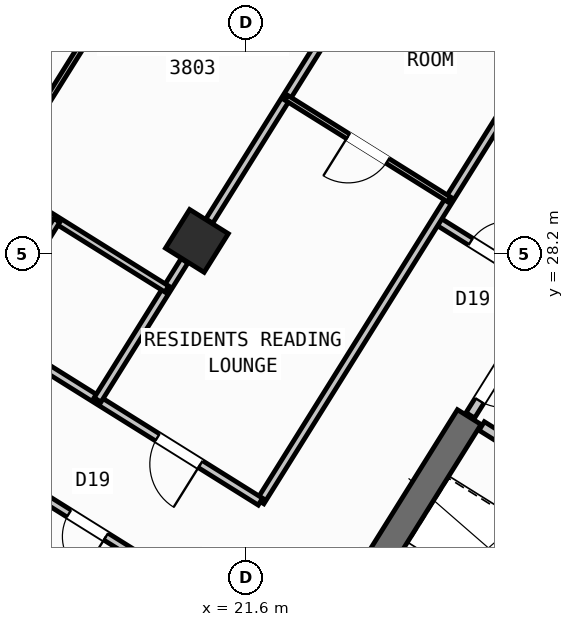
"""IFC4 building model, lengths in metres.
Left out: names, types, materials, properties, quantities, classifications, styles, units other than length and angle.
Written with IfcOpenShell. Run it as: python <this file> out.ifc"""

import sys

from ifc_helpers import new_model, si_unit, direction, frame, frame_2d, origin, origin_2d, place, context, subcontext, project, spatial, rectangle, hollow_rectangle, extrude, source, transform, mapped, element, fill, save


model = new_model("IFC4")
c1 = context("Model", 3, precision=1e-05, world=origin(), true_north=direction((0.0, 1.0)))
c2 = subcontext(c1, "Body", "Model", "MODEL_VIEW")
j1 = project(units=[si_unit("LENGTHUNIT", "METRE"), si_unit("PLANEANGLEUNIT", "RADIAN")], contexts=[c1])
p1 = place(None, origin())
s1 = spatial("IfcSite", under=j1, at=p1, CompositionType="ELEMENT")
p2 = place(p1, origin())
s2 = spatial("IfcBuilding", under=s1, at=p2, CompositionType="ELEMENT")
p3 = place(p2, frame((0.0, 0.0, 151.5)))
s3 = spatial("IfcBuildingStorey", under=s2, at=p3, CompositionType="ELEMENT", Elevation=151.5)
p4 = place(p3, frame((26.007, 24.976, 0.0), z_axis=(0.0, 0.0, 1.0), x_axis=(-0.529923795287, -0.848045264823, 0.0)))
e1 = element("IfcWall", 1, at=p4, inside=s3, PredefinedType="SHEAR", context=c2, shape_type="SweptSolid", body=[
    extrude(rectangle(XDim=6.425, YDim=0.55, at=frame_2d((3.212, 0.0))), origin(), (0.0, 0.0, 1.0), 3.35),
])
m1 = source(origin(), c2, "Body", "SweptSolid", [
    extrude(hollow_rectangle(XDim=0.9, YDim=0.9, WallThickness=0.036, at=origin_2d()), origin(), (0.0, 0.0, 1.0), 3.6),
])
p5 = place(p3, frame((20.632, 28.452, 0.0), z_axis=(0.0, 0.0, 1.0), x_axis=(-0.848048096156, 0.529919264233, 0.0)))
e2 = element("IfcColumn", 2, at=p5, inside=s3, PredefinedType="COLUMN", context=c2, shape_type="MappedRepresentation", body=[
    mapped(m1, transform((0.0, 0.0, 0.0), scale=1.0)),
])
p6 = place(p3, frame((29.268, 6.429, 0.0), z_axis=(0.0, 0.0, 1.0), x_axis=(-0.848049971435, 0.529916263149, 0.0)))
e3 = element("IfcWall", 3, at=p6, inside=s3, PredefinedType="STANDARD", context=c2, shape_type="SweptSolid", body=[
    extrude(rectangle(XDim=31.588, YDim=0.32, at=frame_2d((15.794, 0.0))), origin(), (0.0, 0.0, 1.0), 3.35),
])
p7 = place(p6, frame((16.362, 0.0, 0.0)))
e4 = element("IfcOpeningElement", 4, at=p7, cuts=e3, PredefinedType="OPENING", context=c2, shape_type="SweptSolid", body=[
    extrude(rectangle(XDim=1.2, YDim=2.15, at=frame_2d((0.6, 1.075))), frame((0.0, 0.17, 0.0), z_axis=(0.0, -1.0, 0.0), x_axis=(1.0, 0.0, 0.0)), (0.0, 0.0, 1.0), 0.34),
])
p8 = place(p6, frame((2.989, 0.0, 0.8)))
e5 = element("IfcOpeningElement", 5, at=p8, cuts=e3, PredefinedType="OPENING", context=c2, shape_type="SweptSolid", body=[
    extrude(rectangle(XDim=2.1, YDim=1.55, at=frame_2d((1.05, 0.775))), frame((0.0, 0.17, 0.0), z_axis=(0.0, -1.0, 0.0), x_axis=(1.0, 0.0, 0.0)), (0.0, 0.0, 1.0), 0.34),
])
p9 = place(p6, frame((8.359, 0.0, 0.8)))
e6 = element("IfcOpeningElement", 6, at=p9, cuts=e3, PredefinedType="OPENING", context=c2, shape_type="SweptSolid", body=[
    extrude(rectangle(XDim=2.1, YDim=1.55, at=frame_2d((1.05, 0.775))), frame((0.0, 0.17, 0.0), z_axis=(0.0, -1.0, 0.0), x_axis=(1.0, 0.0, 0.0)), (0.0, 0.0, 1.0), 0.34),
])
p10 = place(p6, frame((13.284, 0.0, 0.95)))
e7 = element("IfcOpeningElement", 7, at=p10, cuts=e3, PredefinedType="OPENING", context=c2, shape_type="SweptSolid", body=[
    extrude(rectangle(XDim=1.2, YDim=1.4, at=frame_2d((0.6, 0.7))), frame((0.0, 0.17, 0.0), z_axis=(0.0, -1.0, 0.0), x_axis=(1.0, 0.0, 0.0)), (0.0, 0.0, 1.0), 0.34),
])
p11 = place(p6, frame((20.259, 0.0, 0.95)))
e8 = element("IfcOpeningElement", 8, at=p11, cuts=e3, PredefinedType="OPENING", context=c2, shape_type="SweptSolid", body=[
    extrude(rectangle(XDim=1.2, YDim=1.4, at=frame_2d((0.6, 0.7))), frame((0.0, 0.17, 0.0), z_axis=(0.0, -1.0, 0.0), x_axis=(1.0, 0.0, 0.0)), (0.0, 0.0, 1.0), 0.34),
])
p12 = place(p6, frame((22.929, 0.0, 0.95)))
e9 = element("IfcOpeningElement", 9, at=p12, cuts=e3, PredefinedType="OPENING", context=c2, shape_type="SweptSolid", body=[
    extrude(rectangle(XDim=1.2, YDim=1.4, at=frame_2d((0.6, 0.7))), frame((0.0, 0.17, 0.0), z_axis=(0.0, -1.0, 0.0), x_axis=(1.0, 0.0, 0.0)), (0.0, 0.0, 1.0), 0.34),
])
p13 = place(p6, frame((27.481, 0.0, 0.8)))
e10 = element("IfcOpeningElement", 10, at=p13, cuts=e3, PredefinedType="OPENING", context=c2, shape_type="SweptSolid", body=[
    extrude(rectangle(XDim=2.1, YDim=1.55, at=frame_2d((1.05, 0.775))), frame((0.0, 0.17, 0.0), z_axis=(0.0, -1.0, 0.0), x_axis=(1.0, 0.0, 0.0)), (0.0, 0.0, 1.0), 0.34),
])
p14 = place(p3, frame((14.138, 41.825, 0.0), z_axis=(0.0, 0.0, 1.0), x_axis=(0.848046498049, -0.529921821731, 0.0)))
e11 = element("IfcWall", 11, at=p14, inside=s3, PredefinedType="STANDARD", context=c2, shape_type="SweptSolid", body=[
    extrude(rectangle(XDim=31.588, YDim=0.32, at=frame_2d((15.794, 0.0))), origin(), (0.0, 0.0, 1.0), 3.35),
])
p15 = place(p14, frame((9.792, 0.0, 0.0)))
e12 = element("IfcOpeningElement", 12, at=p15, cuts=e11, PredefinedType="OPENING", context=c2, shape_type="SweptSolid", body=[
    extrude(rectangle(XDim=1.05, YDim=2.15, at=frame_2d((0.525, 1.075))), frame((0.0, 0.17, 0.0), z_axis=(0.0, -1.0, 0.0), x_axis=(1.0, 0.0, 0.0)), (0.0, 0.0, 1.0), 0.34),
])
p16 = place(p14, frame((0.791, 0.0, 0.85)))
e13 = element("IfcOpeningElement", 13, at=p16, cuts=e11, PredefinedType="OPENING", context=c2, shape_type="SweptSolid", body=[
    extrude(rectangle(XDim=1.8, YDim=1.5, at=frame_2d((0.9, 0.75))), frame((0.0, 0.17, 0.0), z_axis=(0.0, -1.0, 0.0), x_axis=(1.0, 0.0, 0.0)), (0.0, 0.0, 1.0), 0.34),
])
p17 = place(p14, frame((3.996, 0.0, 0.95)))
e14 = element("IfcOpeningElement", 14, at=p17, cuts=e11, PredefinedType="OPENING", context=c2, shape_type="SweptSolid", body=[
    extrude(rectangle(XDim=1.2, YDim=1.4, at=frame_2d((0.6, 0.7))), frame((0.0, 0.17, 0.0), z_axis=(0.0, -1.0, 0.0), x_axis=(1.0, 0.0, 0.0)), (0.0, 0.0, 1.0), 0.34),
])
p18 = place(p14, frame((13.874, 0.0, 0.85)))
e15 = element("IfcOpeningElement", 15, at=p18, cuts=e11, PredefinedType="OPENING", context=c2, shape_type="SweptSolid", body=[
    extrude(rectangle(XDim=1.5, YDim=1.5, at=frame_2d((0.75, 0.75))), frame((0.0, 0.17, 0.0), z_axis=(0.0, -1.0, 0.0), x_axis=(1.0, 0.0, 0.0)), (0.0, 0.0, 1.0), 0.34),
])
p19 = place(p14, frame((17.104, 0.0, 1.0)))
e16 = element("IfcOpeningElement", 16, at=p19, cuts=e11, PredefinedType="OPENING", context=c2, shape_type="SweptSolid", body=[
    extrude(rectangle(XDim=0.9, YDim=1.25, at=frame_2d((0.45, 0.625))), frame((0.0, 0.17, 0.0), z_axis=(0.0, -1.0, 0.0), x_axis=(1.0, 0.0, 0.0)), (0.0, 0.0, 1.0), 0.34),
])
p20 = place(p14, frame((22.069, 0.0, 1.0)))
e17 = element("IfcOpeningElement", 17, at=p20, cuts=e11, PredefinedType="OPENING", context=c2, shape_type="SweptSolid", body=[
    extrude(rectangle(XDim=0.9, YDim=1.25, at=frame_2d((0.45, 0.625))), frame((0.0, 0.17, 0.0), z_axis=(0.0, -1.0, 0.0), x_axis=(1.0, 0.0, 0.0)), (0.0, 0.0, 1.0), 0.34),
])
p21 = place(p14, frame((27.519, 0.0, 1.0)))
e18 = element("IfcOpeningElement", 18, at=p21, cuts=e11, PredefinedType="OPENING", context=c2, shape_type="SweptSolid", body=[
    extrude(rectangle(XDim=0.9, YDim=1.25, at=frame_2d((0.45, 0.625))), frame((0.0, 0.17, 0.0), z_axis=(0.0, -1.0, 0.0), x_axis=(1.0, 0.0, 0.0)), (0.0, 0.0, 1.0), 0.34),
])
p22 = place(p3, frame((31.525, 21.504, 0.0), z_axis=(0.0, 0.0, 1.0), x_axis=(-0.848040211232, 0.529931882541, 0.0)))
e19 = element("IfcWall", 19, at=p22, inside=s3, PredefinedType="STANDARD", context=c2, shape_type="SweptSolid", body=[
    extrude(rectangle(XDim=6.218, YDim=0.2, at=frame_2d((3.109, 0.0))), origin(), (0.0, 0.0, 1.0), 3.34),
])
p23 = place(p22, frame((4.4, 0.0, 0.0)))
e20 = element("IfcOpeningElement", 20, at=p23, cuts=e19, PredefinedType="OPENING", context=c2, shape_type="SweptSolid", body=[
    extrude(rectangle(XDim=0.86, YDim=2.05, at=frame_2d((0.43, 1.025))), frame((0.0, 0.11, 0.0), z_axis=(0.0, -1.0, 0.0), x_axis=(1.0, 0.0, 0.0)), (0.0, 0.0, 1.0), 0.22),
])
p24 = place(p22, frame((0.35, 0.0, 0.0)))
e21 = element("IfcOpeningElement", 21, at=p24, cuts=e19, PredefinedType="OPENING", context=c2, shape_type="SweptSolid", body=[
    extrude(rectangle(XDim=0.86, YDim=2.05, at=frame_2d((0.43, 1.025))), frame((0.0, 0.11, 0.0), z_axis=(0.0, -1.0, 0.0), x_axis=(1.0, 0.0, 0.0)), (0.0, 0.0, 1.0), 0.22),
])
p25 = place(p3, frame((27.596, 27.52, 0.0), z_axis=(0.0, 0.0, 1.0), x_axis=(-0.529865479138, -0.848081702443, 0.0)))
e22 = element("IfcWall", 22, at=p25, inside=s3, PredefinedType="STANDARD", context=c2, shape_type="SweptSolid", body=[
    extrude(rectangle(XDim=2.96, YDim=0.2, at=frame_2d((1.48, 0.0))), origin(), (0.0, 0.0, 1.0), 3.34),
])
p26 = place(p25, frame((1.76, 0.0, 0.0)))
e23 = element("IfcOpeningElement", 23, at=p26, cuts=e22, PredefinedType="OPENING", context=c2, shape_type="SweptSolid", body=[
    extrude(rectangle(XDim=0.86, YDim=2.05, at=frame_2d((0.43, 1.025))), frame((0.0, 0.11, 0.0), z_axis=(0.0, -1.0, 0.0), x_axis=(1.0, 0.0, 0.0)), (0.0, 0.0, 1.0), 0.22),
])
p27 = place(p3, frame((27.57, 27.478, 0.0), z_axis=(0.0, 0.0, 1.0), x_axis=(-0.848050851465, 0.529914854792, 0.0)))
e24 = element("IfcWall", 24, at=p27, inside=s3, PredefinedType="PARTITIONING", context=c2, shape_type="SweptSolid", body=[
    extrude(rectangle(XDim=2.61, YDim=0.16, at=frame_2d((1.305, 0.0))), origin(), (0.0, 0.0, 1.0), 3.34),
])
p28 = place(p27, frame((0.95, 0.0, 0.0)))
e25 = element("IfcOpeningElement", 25, at=p28, cuts=e24, PredefinedType="OPENING", context=c2, shape_type="SweptSolid", body=[
    extrude(rectangle(XDim=0.86, YDim=2.05, at=frame_2d((0.43, 1.025))), frame((0.0, 0.09, 0.0), z_axis=(0.0, -1.0, 0.0), x_axis=(1.0, 0.0, 0.0)), (0.0, 0.0, 1.0), 0.18),
])
p29 = place(p3, frame((27.953, 33.016, 0.0), z_axis=(0.0, 0.0, 1.0), x_axis=(-0.529905022231, -0.848056995381, 0.0)))
e26 = element("IfcWall", 26, at=p29, inside=s3, PredefinedType="PARTITIONING", context=c2, shape_type="SweptSolid", body=[
    extrude(rectangle(XDim=11.45, YDim=0.16, at=frame_2d((5.725, 0.0))), origin(), (0.0, 0.0, 1.0), 3.34),
])
p30 = place(p3, frame((21.885, 23.306, 0.0), z_axis=(0.0, 0.0, 1.0), x_axis=(-0.848052408131, 0.529912363569, 0.0)))
e27 = element("IfcWall", 27, at=p30, inside=s3, PredefinedType="PARTITIONING", context=c2, shape_type="SweptSolid", body=[
    extrude(rectangle(XDim=16.73, YDim=0.16, at=frame_2d((8.365, 0.0))), origin(), (0.0, 0.0, 1.0), 3.34),
])
p31 = place(p30, frame((1.395, 0.0, 0.0)))
e28 = element("IfcOpeningElement", 28, at=p31, cuts=e27, PredefinedType="OPENING", context=c2, shape_type="SweptSolid", body=[
    extrude(rectangle(XDim=1.0, YDim=2.1, at=frame_2d((0.5, 1.05))), frame((0.0, 0.09, 0.0), z_axis=(0.0, -1.0, 0.0), x_axis=(1.0, 0.0, 0.0)), (0.0, 0.0, 1.0), 0.18),
])
p32 = place(p30, frame((7.82, 0.0, 0.0)))
e29 = element("IfcOpeningElement", 29, at=p32, cuts=e27, PredefinedType="OPENING", context=c2, shape_type="SweptSolid", body=[
    extrude(rectangle(XDim=1.0, YDim=2.1, at=frame_2d((0.5, 1.05))), frame((0.0, 0.09, 0.0), z_axis=(0.0, -1.0, 0.0), x_axis=(1.0, 0.0, 0.0)), (0.0, 0.0, 1.0), 0.18),
])
p33 = place(p30, frame((11.14, 0.0, 0.0)))
e30 = element("IfcOpeningElement", 30, at=p33, cuts=e27, PredefinedType="OPENING", context=c2, shape_type="SweptSolid", body=[
    extrude(rectangle(XDim=1.0, YDim=2.1, at=frame_2d((0.5, 1.05))), frame((0.0, 0.09, 0.0), z_axis=(0.0, -1.0, 0.0), x_axis=(1.0, 0.0, 0.0)), (0.0, 0.0, 1.0), 0.18),
])
p34 = place(p3, frame((20.719, 21.44, 0.0), z_axis=(0.0, 0.0, 1.0), x_axis=(-0.848048310262, 0.529918921593, 0.0)))
e31 = element("IfcWall", 31, at=p34, inside=s3, PredefinedType="PARTITIONING", context=c2, shape_type="SweptSolid", body=[
    extrude(rectangle(XDim=16.73, YDim=0.16, at=frame_2d((8.365, 0.0))), origin(), (0.0, 0.0, 1.0), 3.34),
])
p35 = place(p34, frame((2.22, 0.0, 0.0)))
e32 = element("IfcOpeningElement", 32, at=p35, cuts=e31, PredefinedType="OPENING", context=c2, shape_type="SweptSolid", body=[
    extrude(rectangle(XDim=0.86, YDim=2.05, at=frame_2d((0.43, 1.025))), frame((0.0, 0.09, 0.0), z_axis=(0.0, -1.0, 0.0), x_axis=(1.0, 0.0, 0.0)), (0.0, 0.0, 1.0), 0.18),
])
p36 = place(p34, frame((6.49, 0.0, 0.0)))
e33 = element("IfcOpeningElement", 33, at=p36, cuts=e31, PredefinedType="OPENING", context=c2, shape_type="SweptSolid", body=[
    extrude(rectangle(XDim=1.0, YDim=2.1, at=frame_2d((0.5, 1.05))), frame((0.0, 0.09, 0.0), z_axis=(0.0, -1.0, 0.0), x_axis=(1.0, 0.0, 0.0)), (0.0, 0.0, 1.0), 0.18),
])
p37 = place(p34, frame((14.304, 0.0, 0.0)))
e34 = element("IfcOpeningElement", 34, at=p37, cuts=e31, PredefinedType="OPENING", context=c2, shape_type="SweptSolid", body=[
    extrude(rectangle(XDim=1.0, YDim=2.1, at=frame_2d((0.5, 1.05))), frame((0.0, 0.09, 0.0), z_axis=(0.0, -1.0, 0.0), x_axis=(1.0, 0.0, 0.0)), (0.0, 0.0, 1.0), 0.18),
])
p38 = place(p3, frame((24.256, 34.251, 0.0), z_axis=(0.0, 0.0, 1.0), x_axis=(-0.529919772691, -0.848047778437, 0.0)))
e35 = element("IfcWall", 35, at=p38, inside=s3, PredefinedType="PARTITIONING", context=c2, shape_type="SweptSolid", body=[
    extrude(rectangle(XDim=6.376, YDim=0.16, at=frame_2d((3.188, 0.0))), origin(), (0.0, 0.0, 1.0), 2.775),
])
p39 = place(p3, frame((20.387, 28.06, 0.0), z_axis=(0.0, 0.0, 1.0), x_axis=(-0.529890499457, -0.848066069705, 0.0)))
e36 = element("IfcWall", 36, at=p39, inside=s3, PredefinedType="PARTITIONING", context=c2, shape_type="SweptSolid", body=[
    extrude(rectangle(XDim=3.238, YDim=0.16, at=frame_2d((1.619, 0.0))), origin(), (0.0, 0.0, 1.0), 2.775),
])
p40 = place(p3, frame((25.612, 29.269, 0.0), z_axis=(0.0, 0.0, 1.0), x_axis=(-0.84803087207, 0.529946827537, 0.0)))
e37 = element("IfcWall", 37, at=p40, inside=s3, PredefinedType="PARTITIONING", context=c2, shape_type="SweptSolid", body=[
    extrude(rectangle(XDim=3.79, YDim=0.11, at=frame_2d((1.895, 0.0))), origin(), (0.0, 0.0, 1.0), 3.34),
])
p41 = place(p40, frame((1.435, 0.0, 0.0)))
e38 = element("IfcOpeningElement", 38, at=p41, cuts=e37, PredefinedType="OPENING", context=c2, shape_type="SweptSolid", body=[
    extrude(rectangle(XDim=0.92, YDim=2.08, at=frame_2d((0.46, 1.04))), frame((0.0, 0.065, 0.0), z_axis=(0.0, -1.0, 0.0), x_axis=(1.0, 0.0, 0.0)), (0.0, 0.0, 1.0), 0.13),
])
p42 = place(p3, frame((20.039, 27.502, 0.0), z_axis=(0.0, 0.0, 1.0), x_axis=(-0.848039019877, 0.529933789039, 0.0)))
e39 = element("IfcWall", 39, at=p42, inside=s3, PredefinedType="PLUMBINGWALL", context=c2, shape_type="SweptSolid", body=[
    extrude(rectangle(XDim=6.4, YDim=0.14, at=frame_2d((3.2, 0.0))), origin(), (0.0, 0.0, 1.0), 3.34),
])
p43 = place(p42, frame((2.824, 0.0, 0.0)))
e40 = element("IfcOpeningElement", 40, at=p43, cuts=e39, PredefinedType="OPENING", context=c2, shape_type="SweptSolid", body=[
    extrude(rectangle(XDim=0.78, YDim=2.05, at=frame_2d((0.39, 1.025))), frame((0.0, 0.08, 0.0), z_axis=(0.0, -1.0, 0.0), x_axis=(1.0, 0.0, 0.0)), (0.0, 0.0, 1.0), 0.16),
])
p44 = place(p3, frame((17.867, 28.859, 0.0), z_axis=(0.0, 0.0, 1.0), x_axis=(-0.529913878929, -0.848051461244, 0.0)))
e41 = element("IfcWall", 41, at=p44, inside=s3, PredefinedType="PLUMBINGWALL", context=c2, shape_type="SweptSolid", body=[
    extrude(rectangle(XDim=2.58, YDim=0.14, at=frame_2d((1.29, 0.0))), origin(), (0.0, 0.0, 1.0), 3.34),
])
p45 = place(p44, frame((0.9, 0.0, 0.0)))
e42 = element("IfcOpeningElement", 42, at=p45, cuts=e41, PredefinedType="OPENING", context=c2, shape_type="SweptSolid", body=[
    extrude(rectangle(XDim=0.78, YDim=2.05, at=frame_2d((0.39, 1.025))), frame((0.0, 0.08, 0.0), z_axis=(0.0, -1.0, 0.0), x_axis=(1.0, 0.0, 0.0)), (0.0, 0.0, 1.0), 0.16),
])
p46 = place(p3, frame((21.517, 37.356, 0.0), z_axis=(0.0, 0.0, 1.0), x_axis=(-0.529919705034, -0.848047820713, 0.0)))
e43 = element("IfcWall", 43, at=p46, inside=s3, PredefinedType="PARTITIONING", context=c2, shape_type="SweptSolid", body=[
    extrude(rectangle(XDim=9.14, YDim=0.11, at=frame_2d((4.57, 0.0))), origin(), (0.0, 0.0, 1.0), 3.34),
])
p47 = place(p46, frame((0.47, 0.0, 0.0)))
e44 = element("IfcOpeningElement", 44, at=p47, cuts=e43, PredefinedType="OPENING", context=c2, shape_type="SweptSolid", body=[
    extrude(rectangle(XDim=0.92, YDim=2.08, at=frame_2d((0.46, 1.04))), frame((0.0, 0.065, 0.0), z_axis=(0.0, -1.0, 0.0), x_axis=(1.0, 0.0, 0.0)), (0.0, 0.0, 1.0), 0.13),
])
m2 = source(origin(), c2, "Body", "SweptSolid", [
    extrude(rectangle(XDim=0.86, YDim=2.05, at=frame_2d((0.43, 1.025))), frame((0.0, 0.025, 0.0), z_axis=(0.0, -1.0, 0.0), x_axis=(1.0, 0.0, 0.0)), (0.0, 0.0, 1.0), 0.05),
])
p48 = place(p28, frame((0.86, 0.0, 0.0), z_axis=(0.0, 0.0, 1.0), x_axis=(-1.0, 0.0, 0.0)))
e45 = element("IfcDoor", 45, at=p48, inside=s3, OperationType="SINGLE_SWING_RIGHT", PredefinedType="DOOR", context=c2, shape_type="MappedRepresentation", body=[
    mapped(m2, transform((0.0, 0.0, 0.0), scale=1.0)),
])
fill(e25, e45)
p49 = place(p26, origin())
e46 = element("IfcDoor", 46, at=p49, inside=s3, OperationType="SINGLE_SWING_LEFT", PredefinedType="DOOR", context=c2, shape_type="MappedRepresentation", body=[
    mapped(m2, transform((0.0, 0.0, 0.0), scale=1.0)),
])
fill(e23, e46)
p50 = place(p35, origin())
e47 = element("IfcDoor", 47, at=p50, inside=s3, OperationType="SINGLE_SWING_LEFT", PredefinedType="DOOR", context=c2, shape_type="MappedRepresentation", body=[
    mapped(m2, transform((0.0, 0.0, 0.0), scale=1.0)),
])
fill(e32, e47)
m3 = source(origin(), c2, "Body", "SweptSolid", [
    extrude(rectangle(XDim=1.0, YDim=2.1, at=frame_2d((0.5, 1.05))), frame((0.0, 0.025, 0.0), z_axis=(0.0, -1.0, 0.0), x_axis=(1.0, 0.0, 0.0)), (0.0, 0.0, 1.0), 0.05),
])
p51 = place(p31, origin())
e48 = element("IfcDoor", 48, at=p51, inside=s3, OperationType="SINGLE_SWING_LEFT", PredefinedType="DOOR", context=c2, shape_type="MappedRepresentation", body=[
    mapped(m3, transform((0.0, 0.0, 0.0), scale=1.0)),
])
fill(e28, e48)
m4 = source(origin(), c2, "Body", "SweptSolid", [
    extrude(rectangle(XDim=0.92, YDim=2.08, at=frame_2d((0.46, 1.04))), frame((0.0, 0.025, 0.0), z_axis=(0.0, -1.0, 0.0), x_axis=(1.0, 0.0, 0.0)), (0.0, 0.0, 1.0), 0.05),
])
p52 = place(p41, origin())
e49 = element("IfcDoor", 49, at=p52, inside=s3, OperationType="SINGLE_SWING_RIGHT", PredefinedType="DOOR", context=c2, shape_type="MappedRepresentation", body=[
    mapped(m4, transform((0.0, 0.0, 0.0), scale=1.0)),
])
fill(e38, e49)
save(model, sys.argv[1])
